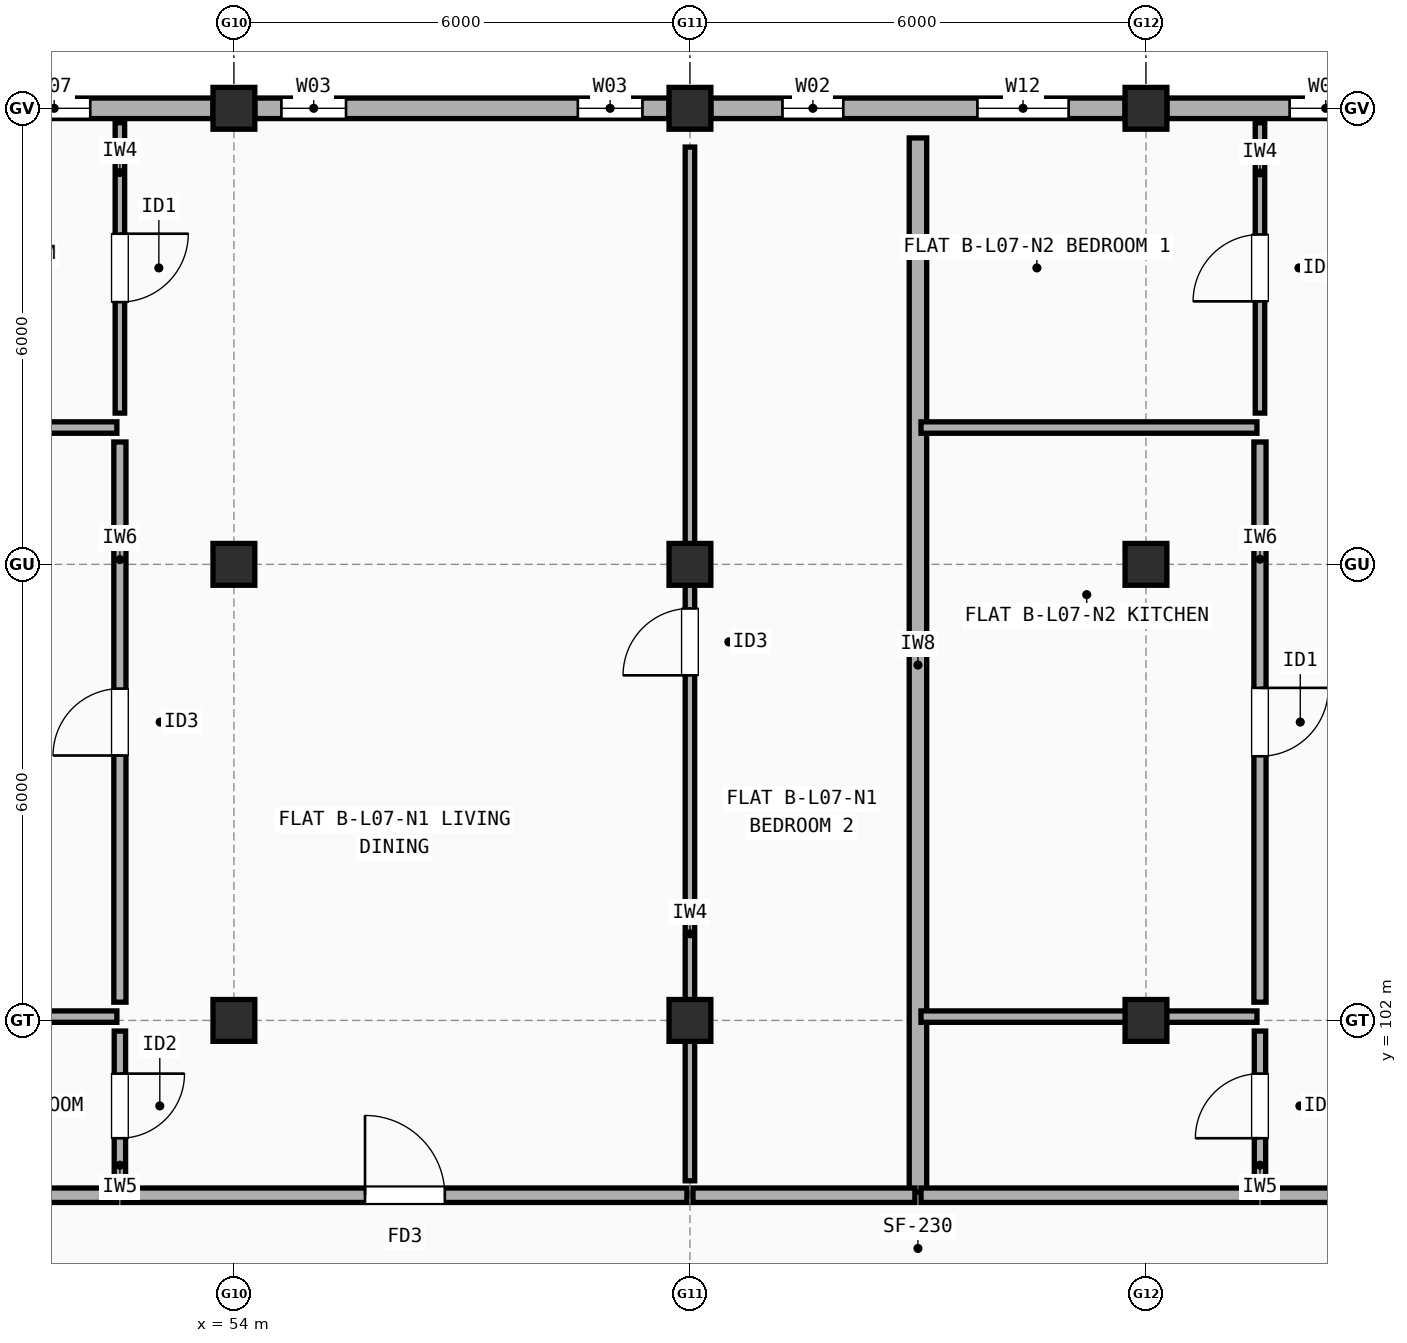
"""IFC4 building model, lengths in metres.
Left out: names, types, materials, properties, quantities, classifications, styles, units other than length and angle.
Written with IfcOpenShell. Run it as: python <this file> out.ifc"""

import sys

from ifc_helpers import new_model, si_unit, direction, frame, frame_2d, origin, origin_2d, place, context, subcontext, project, spatial, rectangle, extrude, element, fill, save


model = new_model("IFC4")
c1 = context("Model", 3, precision=1e-05, world=origin(), true_north=direction((0.0, 1.0)))
c2 = subcontext(c1, "Body", "Model", "MODEL_VIEW")
j1 = project(units=[si_unit("LENGTHUNIT", "METRE"), si_unit("PLANEANGLEUNIT", "RADIAN")], contexts=[c1])
p1 = place(None, origin())
s1 = spatial("IfcSite", under=j1, at=p1, CompositionType="ELEMENT")
p2 = place(p1, origin())
s2 = spatial("IfcBuilding", under=s1, at=p2, CompositionType="ELEMENT")
p3 = place(p2, frame((0.0, 0.0, 23.7)))
s3 = spatial("IfcBuildingStorey", under=s2, at=p3, CompositionType="ELEMENT", Elevation=23.7)
for number, where, z_axis, x_axis in (
    (1, (54.0, 102.0, 0.0), (0.0, 0.0, 1.0), (1.0, 0.0, 0.0)),
    (2, (54.0, 108.0, 0.0), (0.0, 0.0, 1.0), (1.0, 0.0, 0.0)),
    (3, (54.0, 114.0, 0.0), (0.0, 0.0, 1.0), (1.0, 0.0, 0.0)),
    (4, (60.0, 102.0, 0.0), (0.0, 0.0, 1.0), (1.0, 0.0, 0.0)),
    (5, (60.0, 108.0, 0.0), (0.0, 0.0, 1.0), (1.0, 0.0, 0.0)),
    (6, (60.0, 114.0, 0.0), (0.0, 0.0, 1.0), (1.0, 0.0, 0.0)),
    (7, (66.0, 102.0, 0.0), (0.0, 0.0, 1.0), (1.0, 0.0, 0.0)),
    (8, (66.0, 108.0, 0.0), (0.0, 0.0, 1.0), (1.0, 0.0, 0.0)),
    (9, (66.0, 114.0, 0.0), (0.0, 0.0, 1.0), (1.0, 0.0, 0.0)),
):
    element("IfcColumn", number, at=place(p3, frame(where, z_axis=z_axis, x_axis=x_axis)), inside=s3, PredefinedType="COLUMN", context=c2, shape_type="SweptSolid", body=[
        extrude(rectangle(XDim=0.55, YDim=0.55, at=origin_2d()), origin(), (0.0, 0.0, 1.0), 2.975),
    ])
p4 = place(p3, frame((71.725, 114.0, 0.0), z_axis=(0.0, 0.0, 1.0), x_axis=(-1.0, 0.0, 0.0)))
e10 = element("IfcWall", 10, at=p4, inside=s3, PredefinedType="STANDARD", context=c2, shape_type="SweptSolid", body=[
    extrude(rectangle(XDim=5.45, YDim=0.27, at=frame_2d((2.725, 0.0))), origin(), (0.0, 0.0, 1.0), 2.457),
])
p5 = place(p4, frame((0.35, 0.0, 0.9)))
e11 = element("IfcOpeningElement", 11, at=p5, cuts=e10, PredefinedType="OPENING", context=c2, shape_type="SweptSolid", body=[
    extrude(rectangle(XDim=0.95, YDim=1.35, at=frame_2d((0.475, 0.675))), frame((0.0, 0.145, 0.0), z_axis=(0.0, -1.0, 0.0), x_axis=(1.0, 0.0, 0.0)), (0.0, 0.0, 1.0), 0.29),
])
p6 = place(p4, frame((2.885, 0.0, 0.9)))
e12 = element("IfcOpeningElement", 12, at=p6, cuts=e10, PredefinedType="OPENING", context=c2, shape_type="SweptSolid", body=[
    extrude(rectangle(XDim=0.95, YDim=1.35, at=frame_2d((0.475, 0.675))), frame((0.0, 0.145, 0.0), z_axis=(0.0, -1.0, 0.0), x_axis=(1.0, 0.0, 0.0)), (0.0, 0.0, 1.0), 0.29),
])
p7 = place(p3, frame((65.725, 114.0, 0.0), z_axis=(0.0, 0.0, 1.0), x_axis=(-1.0, 0.0, 0.0)))
e13 = element("IfcWall", 13, at=p7, inside=s3, PredefinedType="STANDARD", context=c2, shape_type="SweptSolid", body=[
    extrude(rectangle(XDim=5.45, YDim=0.27, at=frame_2d((2.725, 0.0))), origin(), (0.0, 0.0, 1.0), 2.457),
])
p8 = place(p7, frame((0.742, 0.0, 0.9)))
e14 = element("IfcOpeningElement", 14, at=p8, cuts=e13, PredefinedType="OPENING", context=c2, shape_type="SweptSolid", body=[
    extrude(rectangle(XDim=1.2, YDim=1.35, at=frame_2d((0.6, 0.675))), frame((0.0, 0.145, 0.0), z_axis=(0.0, -1.0, 0.0), x_axis=(1.0, 0.0, 0.0)), (0.0, 0.0, 1.0), 0.29),
])
p9 = place(p7, frame((3.708, 0.0, 0.9)))
e15 = element("IfcOpeningElement", 15, at=p9, cuts=e13, PredefinedType="OPENING", context=c2, shape_type="SweptSolid", body=[
    extrude(rectangle(XDim=0.8, YDim=1.2, at=frame_2d((0.4, 0.6))), frame((0.0, 0.145, 0.0), z_axis=(0.0, -1.0, 0.0), x_axis=(1.0, 0.0, 0.0)), (0.0, 0.0, 1.0), 0.29),
])
p10 = place(p3, frame((59.725, 114.0, 0.0), z_axis=(0.0, 0.0, 1.0), x_axis=(-1.0, 0.0, 0.0)))
e16 = element("IfcWall", 16, at=p10, inside=s3, PredefinedType="STANDARD", context=c2, shape_type="SweptSolid", body=[
    extrude(rectangle(XDim=5.45, YDim=0.27, at=frame_2d((2.725, 0.0))), origin(), (0.0, 0.0, 1.0), 2.457),
])
p11 = place(p10, frame((0.35, 0.0, 0.9)))
e17 = element("IfcOpeningElement", 17, at=p11, cuts=e16, PredefinedType="OPENING", context=c2, shape_type="SweptSolid", body=[
    extrude(rectangle(XDim=0.85, YDim=1.25, at=frame_2d((0.425, 0.625))), frame((0.0, 0.145, 0.0), z_axis=(0.0, -1.0, 0.0), x_axis=(1.0, 0.0, 0.0)), (0.0, 0.0, 1.0), 0.29),
])
p12 = place(p10, frame((4.25, 0.0, 0.9)))
e18 = element("IfcOpeningElement", 18, at=p12, cuts=e16, PredefinedType="OPENING", context=c2, shape_type="SweptSolid", body=[
    extrude(rectangle(XDim=0.85, YDim=1.25, at=frame_2d((0.425, 0.625))), frame((0.0, 0.145, 0.0), z_axis=(0.0, -1.0, 0.0), x_axis=(1.0, 0.0, 0.0)), (0.0, 0.0, 1.0), 0.29),
])
p13 = place(p3, frame((53.725, 114.0, 0.0), z_axis=(0.0, 0.0, 1.0), x_axis=(-1.0, 0.0, 0.0)))
e19 = element("IfcWall", 19, at=p13, inside=s3, PredefinedType="STANDARD", context=c2, shape_type="SweptSolid", body=[
    extrude(rectangle(XDim=5.475, YDim=0.27, at=frame_2d((2.738, 0.0))), origin(), (0.0, 0.0, 1.0), 2.457),
])
p14 = place(p13, frame((1.615, 0.0, 0.9)))
e20 = element("IfcOpeningElement", 20, at=p14, cuts=e19, PredefinedType="OPENING", context=c2, shape_type="SweptSolid", body=[
    extrude(rectangle(XDim=0.95, YDim=1.35, at=frame_2d((0.475, 0.675))), frame((0.0, 0.145, 0.0), z_axis=(0.0, -1.0, 0.0), x_axis=(1.0, 0.0, 0.0)), (0.0, 0.0, 1.0), 0.29),
])
p15 = place(p13, frame((4.175, 0.0, 0.9)))
e21 = element("IfcOpeningElement", 21, at=p15, cuts=e19, PredefinedType="OPENING", context=c2, shape_type="SweptSolid", body=[
    extrude(rectangle(XDim=0.95, YDim=1.35, at=frame_2d((0.475, 0.675))), frame((0.0, 0.145, 0.0), z_axis=(0.0, -1.0, 0.0), x_axis=(1.0, 0.0, 0.0)), (0.0, 0.0, 1.0), 0.29),
])
p16 = place(p3, frame((63.0, 99.74, 0.0), z_axis=(0.0, 0.0, 1.0), x_axis=(0.0, 1.0, 0.0)))
e22 = element("IfcWall", 22, at=p16, inside=s3, PredefinedType="SOLIDWALL", context=c2, shape_type="SweptSolid", body=[
    extrude(rectangle(XDim=13.87, YDim=0.23, at=frame_2d((6.935, 0.0))), origin(), (0.0, 0.0, 1.0), 2.457),
])
p17 = place(p3, frame((48.04, 99.7, 0.0), z_axis=(0.0, 0.0, 1.0), x_axis=(1.0, 0.0, 0.0)))
e23 = element("IfcWall", 23, at=p17, inside=s3, PredefinedType="SOLIDWALL", context=c2, shape_type="SweptSolid", body=[
    extrude(rectangle(XDim=4.42, YDim=0.19, at=frame_2d((2.21, 0.0))), origin(), (0.0, 0.0, 1.0), 2.457),
])
p18 = place(p3, frame((52.54, 99.7, 0.0), z_axis=(0.0, 0.0, 1.0), x_axis=(1.0, 0.0, 0.0)))
e24 = element("IfcWall", 24, at=p18, inside=s3, PredefinedType="SOLIDWALL", context=c2, shape_type="SweptSolid", body=[
    extrude(rectangle(XDim=7.42, YDim=0.19, at=frame_2d((3.71, 0.0))), origin(), (0.0, 0.0, 1.0), 2.508),
])
p19 = place(p18, frame((3.185, 0.0, 0.0)))
e25 = element("IfcOpeningElement", 25, at=p19, cuts=e24, PredefinedType="OPENING", context=c2, shape_type="SweptSolid", body=[
    extrude(rectangle(XDim=1.05, YDim=2.15, at=frame_2d((0.525, 1.075))), frame((0.0, 0.105, 0.0), z_axis=(0.0, -1.0, 0.0), x_axis=(1.0, 0.0, 0.0)), (0.0, 0.0, 1.0), 0.21),
])
p20 = place(p3, frame((52.5, 109.99, 0.0), z_axis=(0.0, 0.0, 1.0), x_axis=(0.0, 1.0, 0.0)))
e26 = element("IfcWall", 26, at=p20, inside=s3, PredefinedType="PARTITIONING", context=c2, shape_type="SweptSolid", body=[
    extrude(rectangle(XDim=3.82, YDim=0.125, at=frame_2d((1.91, 0.0))), origin(), (0.0, 0.0, 1.0), 2.975),
])
p21 = place(p20, frame((1.46, 0.0, 0.0)))
e27 = element("IfcOpeningElement", 27, at=p21, cuts=e26, PredefinedType="OPENING", context=c2, shape_type="SweptSolid", body=[
    extrude(rectangle(XDim=0.9, YDim=2.1, at=frame_2d((0.45, 1.05))), frame((0.0, 0.073, 0.0), z_axis=(0.0, -1.0, 0.0), x_axis=(1.0, 0.0, 0.0)), (0.0, 0.0, 1.0), 0.145),
])
p22 = place(p3, frame((52.5, 102.24, 0.0), z_axis=(0.0, 0.0, 1.0), x_axis=(0.0, 1.0, 0.0)))
e28 = element("IfcWall", 28, at=p22, inside=s3, PredefinedType="PLUMBINGWALL", context=c2, shape_type="SweptSolid", body=[
    extrude(rectangle(XDim=7.37, YDim=0.16, at=frame_2d((3.685, 0.0))), origin(), (0.0, 0.0, 1.0), 2.457),
])
p23 = place(p22, frame((3.245, 0.0, 0.0)))
e29 = element("IfcOpeningElement", 29, at=p23, cuts=e28, PredefinedType="OPENING", context=c2, shape_type="SweptSolid", body=[
    extrude(rectangle(XDim=0.88, YDim=2.1, at=frame_2d((0.44, 1.05))), frame((0.0, 0.09, 0.0), z_axis=(0.0, -1.0, 0.0), x_axis=(1.0, 0.0, 0.0)), (0.0, 0.0, 1.0), 0.18),
])
p24 = place(p3, frame((52.5, 99.89, 0.0), z_axis=(0.0, 0.0, 1.0), x_axis=(0.0, 1.0, 0.0)))
e30 = element("IfcWall", 30, at=p24, inside=s3, PredefinedType="PARTITIONING", context=c2, shape_type="SweptSolid", body=[
    extrude(rectangle(XDim=1.97, YDim=0.15, at=frame_2d((0.985, 0.0))), origin(), (0.0, 0.0, 1.0), 2.975),
])
p25 = place(p24, frame((0.56, 0.0, 0.0)))
e31 = element("IfcOpeningElement", 31, at=p25, cuts=e30, PredefinedType="OPENING", context=c2, shape_type="SweptSolid", body=[
    extrude(rectangle(XDim=0.85, YDim=2.1, at=frame_2d((0.425, 1.05))), frame((0.0, 0.085, 0.0), z_axis=(0.0, -1.0, 0.0), x_axis=(1.0, 0.0, 0.0)), (0.0, 0.0, 1.0), 0.17),
])
p26 = place(p3, frame((48.04, 109.8, 0.0), z_axis=(0.0, 0.0, 1.0), x_axis=(1.0, 0.0, 0.0)))
e32 = element("IfcWall", 32, at=p26, inside=s3, PredefinedType="PARTITIONING", context=c2, shape_type="SweptSolid", body=[
    extrude(rectangle(XDim=4.42, YDim=0.15, at=frame_2d((2.21, 0.0))), origin(), (0.0, 0.0, 1.0), 2.457),
])
p27 = place(p3, frame((48.36, 102.05, 0.0), z_axis=(0.0, 0.0, 1.0), x_axis=(1.0, 0.0, 0.0)))
e33 = element("IfcWall", 33, at=p27, inside=s3, PredefinedType="PARTITIONING", context=c2, shape_type="SweptSolid", body=[
    extrude(rectangle(XDim=4.1, YDim=0.15, at=frame_2d((2.05, 0.0))), origin(), (0.0, 0.0, 1.0), 2.457),
])
p28 = place(p3, frame((60.04, 99.7, 0.0), z_axis=(0.0, 0.0, 1.0), x_axis=(1.0, 0.0, 0.0)))
e34 = element("IfcWall", 34, at=p28, inside=s3, PredefinedType="SOLIDWALL", context=c2, shape_type="SweptSolid", body=[
    extrude(rectangle(XDim=2.92, YDim=0.19, at=frame_2d((1.46, 0.0))), origin(), (0.0, 0.0, 1.0), 2.508),
])
p29 = place(p3, frame((60.0, 99.89, 0.0), z_axis=(0.0, 0.0, 1.0), x_axis=(0.0, 1.0, 0.0)))
e35 = element("IfcWall", 35, at=p29, inside=s3, PredefinedType="PARTITIONING", context=c2, shape_type="SweptSolid", body=[
    extrude(rectangle(XDim=13.6, YDim=0.125, at=frame_2d((6.8, 0.0))), origin(), (0.0, 0.0, 1.0), 2.458),
])
p30 = place(p29, frame((6.65, 0.0, 0.0)))
e36 = element("IfcOpeningElement", 36, at=p30, cuts=e35, PredefinedType="OPENING", context=c2, shape_type="SweptSolid", body=[
    extrude(rectangle(XDim=0.88, YDim=2.1, at=frame_2d((0.44, 1.05))), frame((0.0, 0.073, 0.0), z_axis=(0.0, -1.0, 0.0), x_axis=(1.0, 0.0, 0.0)), (0.0, 0.0, 1.0), 0.145),
])
p31 = place(p3, frame((63.04, 99.7, 0.0), z_axis=(0.0, 0.0, 1.0), x_axis=(1.0, 0.0, 0.0)))
e37 = element("IfcWall", 37, at=p31, inside=s3, PredefinedType="SOLIDWALL", context=c2, shape_type="SweptSolid", body=[
    extrude(rectangle(XDim=4.42, YDim=0.19, at=frame_2d((2.21, 0.0))), origin(), (0.0, 0.0, 1.0), 2.975),
])
p32 = place(p3, frame((67.54, 99.7, 0.0), z_axis=(0.0, 0.0, 1.0), x_axis=(1.0, 0.0, 0.0)))
e38 = element("IfcWall", 38, at=p32, inside=s3, PredefinedType="SOLIDWALL", context=c2, shape_type="SweptSolid", body=[
    extrude(rectangle(XDim=7.42, YDim=0.19, at=frame_2d((3.71, 0.0))), origin(), (0.0, 0.0, 1.0), 2.975),
])
p33 = place(p32, frame((3.22, 0.0, 0.0)))
e39 = element("IfcOpeningElement", 39, at=p33, cuts=e38, PredefinedType="OPENING", context=c2, shape_type="SweptSolid", body=[
    extrude(rectangle(XDim=0.98, YDim=2.15, at=frame_2d((0.49, 1.075))), frame((0.0, 0.105, 0.0), z_axis=(0.0, -1.0, 0.0), x_axis=(1.0, 0.0, 0.0)), (0.0, 0.0, 1.0), 0.21),
])
p34 = place(p3, frame((67.5, 109.99, 0.0), z_axis=(0.0, 0.0, 1.0), x_axis=(0.0, 1.0, 0.0)))
e40 = element("IfcWall", 40, at=p34, inside=s3, PredefinedType="PARTITIONING", context=c2, shape_type="SweptSolid", body=[
    extrude(rectangle(XDim=3.82, YDim=0.125, at=frame_2d((1.91, 0.0))), origin(), (0.0, 0.0, 1.0), 2.975),
])
p35 = place(p34, frame((1.47, 0.0, 0.0)))
e41 = element("IfcOpeningElement", 41, at=p35, cuts=e40, PredefinedType="OPENING", context=c2, shape_type="SweptSolid", body=[
    extrude(rectangle(XDim=0.88, YDim=2.1, at=frame_2d((0.44, 1.05))), frame((0.0, 0.073, 0.0), z_axis=(0.0, -1.0, 0.0), x_axis=(1.0, 0.0, 0.0)), (0.0, 0.0, 1.0), 0.145),
])
p36 = place(p3, frame((67.5, 102.24, 0.0), z_axis=(0.0, 0.0, 1.0), x_axis=(0.0, 1.0, 0.0)))
e42 = element("IfcWall", 42, at=p36, inside=s3, PredefinedType="PLUMBINGWALL", context=c2, shape_type="SweptSolid", body=[
    extrude(rectangle(XDim=7.37, YDim=0.16, at=frame_2d((3.685, 0.0))), origin(), (0.0, 0.0, 1.0), 2.457),
])
p37 = place(p36, frame((3.235, 0.0, 0.0)))
e43 = element("IfcOpeningElement", 43, at=p37, cuts=e42, PredefinedType="OPENING", context=c2, shape_type="SweptSolid", body=[
    extrude(rectangle(XDim=0.9, YDim=2.1, at=frame_2d((0.45, 1.05))), frame((0.0, 0.09, 0.0), z_axis=(0.0, -1.0, 0.0), x_axis=(1.0, 0.0, 0.0)), (0.0, 0.0, 1.0), 0.18),
])
p38 = place(p3, frame((67.5, 99.89, 0.0), z_axis=(0.0, 0.0, 1.0), x_axis=(0.0, 1.0, 0.0)))
e44 = element("IfcWall", 44, at=p38, inside=s3, PredefinedType="PARTITIONING", context=c2, shape_type="SweptSolid", body=[
    extrude(rectangle(XDim=1.97, YDim=0.15, at=frame_2d((0.985, 0.0))), origin(), (0.0, 0.0, 1.0), 2.975),
])
p39 = place(p38, frame((0.56, 0.0, 0.0)))
e45 = element("IfcOpeningElement", 45, at=p39, cuts=e44, PredefinedType="OPENING", context=c2, shape_type="SweptSolid", body=[
    extrude(rectangle(XDim=0.85, YDim=2.1, at=frame_2d((0.425, 1.05))), frame((0.0, 0.085, 0.0), z_axis=(0.0, -1.0, 0.0), x_axis=(1.0, 0.0, 0.0)), (0.0, 0.0, 1.0), 0.17),
])
p40 = place(p3, frame((63.04, 109.8, 0.0), z_axis=(0.0, 0.0, 1.0), x_axis=(1.0, 0.0, 0.0)))
e46 = element("IfcWall", 46, at=p40, inside=s3, PredefinedType="PARTITIONING", context=c2, shape_type="SweptSolid", body=[
    extrude(rectangle(XDim=4.42, YDim=0.15, at=frame_2d((2.21, 0.0))), origin(), (0.0, 0.0, 1.0), 2.458),
])
p41 = place(p3, frame((63.04, 102.05, 0.0), z_axis=(0.0, 0.0, 1.0), x_axis=(1.0, 0.0, 0.0)))
e47 = element("IfcWall", 47, at=p41, inside=s3, PredefinedType="PARTITIONING", context=c2, shape_type="SweptSolid", body=[
    extrude(rectangle(XDim=4.42, YDim=0.15, at=frame_2d((2.21, 0.0))), origin(), (0.0, 0.0, 1.0), 2.457),
])
p42 = place(p6, origin())
e48 = element("IfcWindow", 48, at=p42, inside=s3, PartitioningType="SINGLE_PANEL", PredefinedType="WINDOW", context=c2, shape_type="SweptSolid", body=[
    extrude(rectangle(XDim=0.95, YDim=1.35, at=frame_2d((0.475, 0.675))), frame((0.0, 0.03, 0.0), z_axis=(0.0, -1.0, 0.0), x_axis=(1.0, 0.0, 0.0)), (0.0, 0.0, 1.0), 0.06),
])
fill(e12, e48)
p43 = place(p8, origin())
e49 = element("IfcWindow", 49, at=p43, inside=s3, PartitioningType="SINGLE_PANEL", PredefinedType="WINDOW", context=c2, shape_type="SweptSolid", body=[
    extrude(rectangle(XDim=1.2, YDim=1.35, at=frame_2d((0.6, 0.675))), frame((0.0, 0.03, 0.0), z_axis=(0.0, -1.0, 0.0), x_axis=(1.0, 0.0, 0.0)), (0.0, 0.0, 1.0), 0.06),
])
fill(e14, e49)
p44 = place(p9, origin())
e50 = element("IfcWindow", 50, at=p44, inside=s3, PartitioningType="SINGLE_PANEL", PredefinedType="WINDOW", context=c2, shape_type="SweptSolid", body=[
    extrude(rectangle(XDim=0.8, YDim=1.2, at=frame_2d((0.4, 0.6))), frame((0.0, 0.03, 0.0), z_axis=(0.0, -1.0, 0.0), x_axis=(1.0, 0.0, 0.0)), (0.0, 0.0, 1.0), 0.06),
])
fill(e15, e50)
p45 = place(p11, origin())
e51 = element("IfcWindow", 51, at=p45, inside=s3, PartitioningType="SINGLE_PANEL", PredefinedType="WINDOW", context=c2, shape_type="SweptSolid", body=[
    extrude(rectangle(XDim=0.85, YDim=1.25, at=frame_2d((0.425, 0.625))), frame((0.0, 0.03, 0.0), z_axis=(0.0, -1.0, 0.0), x_axis=(1.0, 0.0, 0.0)), (0.0, 0.0, 1.0), 0.06),
])
fill(e17, e51)
p46 = place(p12, origin())
e52 = element("IfcWindow", 52, at=p46, inside=s3, PartitioningType="SINGLE_PANEL", PredefinedType="WINDOW", context=c2, shape_type="SweptSolid", body=[
    extrude(rectangle(XDim=0.85, YDim=1.25, at=frame_2d((0.425, 0.625))), frame((0.0, 0.03, 0.0), z_axis=(0.0, -1.0, 0.0), x_axis=(1.0, 0.0, 0.0)), (0.0, 0.0, 1.0), 0.06),
])
fill(e18, e52)
p47 = place(p14, origin())
e53 = element("IfcWindow", 53, at=p47, inside=s3, PartitioningType="SINGLE_PANEL", PredefinedType="WINDOW", context=c2, shape_type="SweptSolid", body=[
    extrude(rectangle(XDim=0.95, YDim=1.35, at=frame_2d((0.475, 0.675))), frame((0.0, 0.03, 0.0), z_axis=(0.0, -1.0, 0.0), x_axis=(1.0, 0.0, 0.0)), (0.0, 0.0, 1.0), 0.06),
])
fill(e20, e53)
p48 = place(p19, origin())
e54 = element("IfcDoor", 54, at=p48, inside=s3, OperationType="SINGLE_SWING_LEFT", PredefinedType="DOOR", context=c2, shape_type="SweptSolid", body=[
    extrude(rectangle(XDim=1.05, YDim=2.15, at=frame_2d((0.525, 1.075))), frame((0.0, 0.025, 0.0), z_axis=(0.0, -1.0, 0.0), x_axis=(1.0, 0.0, 0.0)), (0.0, 0.0, 1.0), 0.05),
])
fill(e25, e54)
p49 = place(p21, origin())
e55 = element("IfcDoor", 55, at=p49, inside=s3, OperationType="SINGLE_SWING_RIGHT", PredefinedType="DOOR", context=c2, shape_type="SweptSolid", body=[
    extrude(rectangle(XDim=0.9, YDim=2.1, at=frame_2d((0.45, 1.05))), frame((0.0, 0.025, 0.0), z_axis=(0.0, -1.0, 0.0), x_axis=(1.0, 0.0, 0.0)), (0.0, 0.0, 1.0), 0.05),
])
fill(e27, e55)
p50 = place(p23, origin())
e56 = element("IfcDoor", 56, at=p50, inside=s3, OperationType="SINGLE_SWING_LEFT", PredefinedType="DOOR", context=c2, shape_type="SweptSolid", body=[
    extrude(rectangle(XDim=0.88, YDim=2.1, at=frame_2d((0.44, 1.05))), frame((0.0, 0.025, 0.0), z_axis=(0.0, -1.0, 0.0), x_axis=(1.0, 0.0, 0.0)), (0.0, 0.0, 1.0), 0.05),
])
fill(e29, e56)
p51 = place(p25, origin())
e57 = element("IfcDoor", 57, at=p51, inside=s3, OperationType="SINGLE_SWING_RIGHT", PredefinedType="DOOR", context=c2, shape_type="SweptSolid", body=[
    extrude(rectangle(XDim=0.85, YDim=2.1, at=frame_2d((0.425, 1.05))), frame((0.0, 0.025, 0.0), z_axis=(0.0, -1.0, 0.0), x_axis=(1.0, 0.0, 0.0)), (0.0, 0.0, 1.0), 0.05),
])
fill(e31, e57)
p52 = place(p30, origin())
e58 = element("IfcDoor", 58, at=p52, inside=s3, OperationType="SINGLE_SWING_LEFT", PredefinedType="DOOR", context=c2, shape_type="SweptSolid", body=[
    extrude(rectangle(XDim=0.88, YDim=2.1, at=frame_2d((0.44, 1.05))), frame((0.0, 0.025, 0.0), z_axis=(0.0, -1.0, 0.0), x_axis=(1.0, 0.0, 0.0)), (0.0, 0.0, 1.0), 0.05),
])
fill(e36, e58)
p53 = place(p35, origin())
e59 = element("IfcDoor", 59, at=p53, inside=s3, OperationType="SINGLE_SWING_LEFT", PredefinedType="DOOR", context=c2, shape_type="SweptSolid", body=[
    extrude(rectangle(XDim=0.88, YDim=2.1, at=frame_2d((0.44, 1.05))), frame((0.0, 0.025, 0.0), z_axis=(0.0, -1.0, 0.0), x_axis=(1.0, 0.0, 0.0)), (0.0, 0.0, 1.0), 0.05),
])
fill(e41, e59)
p54 = place(p37, origin())
e60 = element("IfcDoor", 60, at=p54, inside=s3, OperationType="SINGLE_SWING_RIGHT", PredefinedType="DOOR", context=c2, shape_type="SweptSolid", body=[
    extrude(rectangle(XDim=0.9, YDim=2.1, at=frame_2d((0.45, 1.05))), frame((0.0, 0.025, 0.0), z_axis=(0.0, -1.0, 0.0), x_axis=(1.0, 0.0, 0.0)), (0.0, 0.0, 1.0), 0.05),
])
fill(e43, e60)
p55 = place(p39, origin())
e61 = element("IfcDoor", 61, at=p55, inside=s3, OperationType="SINGLE_SWING_LEFT", PredefinedType="DOOR", context=c2, shape_type="SweptSolid", body=[
    extrude(rectangle(XDim=0.85, YDim=2.1, at=frame_2d((0.425, 1.05))), frame((0.0, 0.025, 0.0), z_axis=(0.0, -1.0, 0.0), x_axis=(1.0, 0.0, 0.0)), (0.0, 0.0, 1.0), 0.05),
])
fill(e45, e61)
save(model, sys.argv[1])
